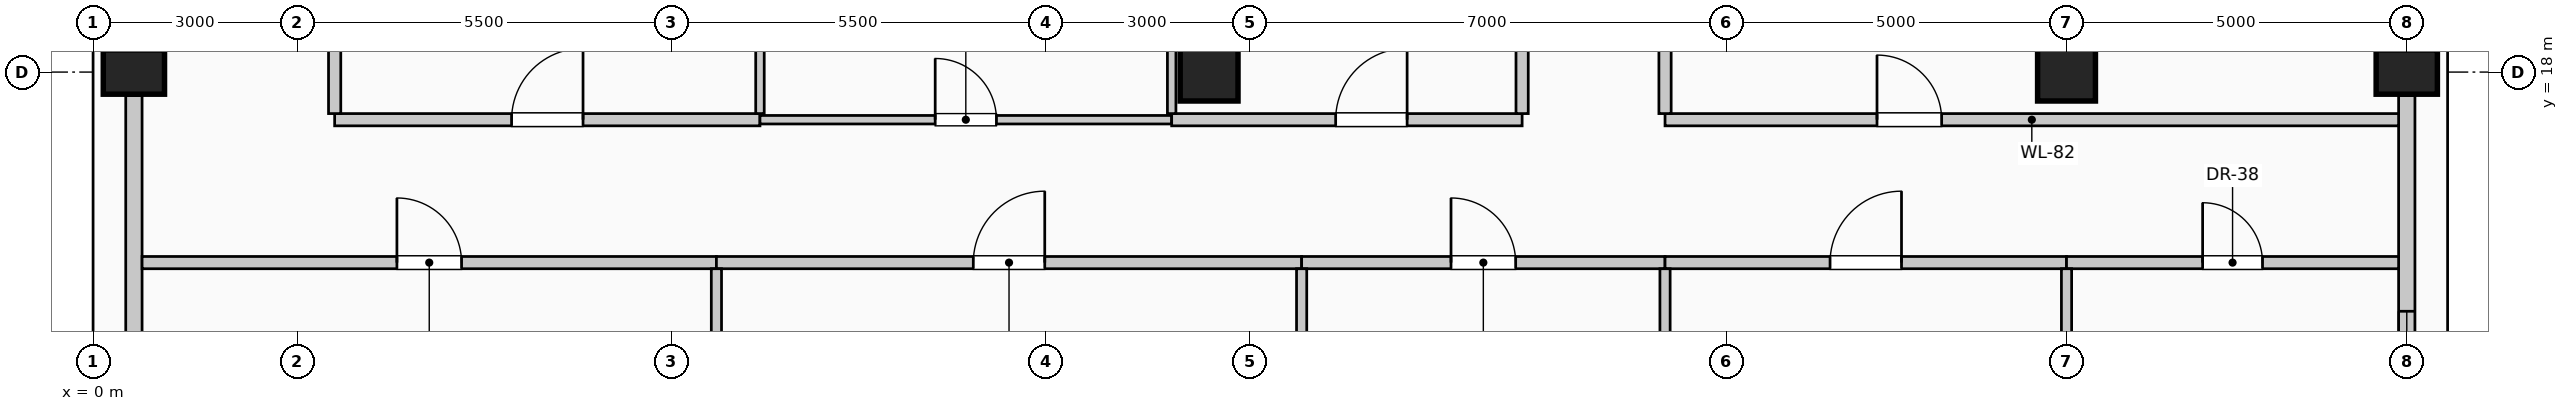
"""IFC4 building model, lengths in metres.
Left out: names, types, materials, properties, quantities, classifications, styles, units other than length and angle.
Written with IfcOpenShell. Run it as: python <this file> out.ifc"""

import sys

from ifc_helpers import new_model, si_unit, direction, frame, frame_2d, origin, origin_2d, place, context, subcontext, project, spatial, rectangle, circle, extrude, element, fill, save


model = new_model("IFC4")
c1 = context("Model", 3, precision=1e-05, world=origin(), true_north=direction((0.0, 1.0)))
c2 = subcontext(c1, "Body", "Model", "MODEL_VIEW")
j1 = project(units=[si_unit("LENGTHUNIT", "METRE"), si_unit("PLANEANGLEUNIT", "RADIAN")], contexts=[c1])
p1 = place(None, origin())
s1 = spatial("IfcSite", under=j1, at=p1, CompositionType="ELEMENT")
p2 = place(p1, origin())
s2 = spatial("IfcBuilding", under=s1, at=p2, CompositionType="ELEMENT")
p3 = place(p2, frame((0.0, 0.0, 309.0)))
s3 = spatial("IfcBuildingStorey", under=s2, at=p3, CompositionType="ELEMENT", Elevation=309.0)
for number, where, z_axis, x_axis in (
    (1, (0.6, 18.0, 0.0), (0.0, 0.0, 1.0), (0.0, 1.0, 0.0)),
    (2, (34.0, 18.0, 0.0), (0.0, 0.0, 1.0), (0.0, 1.0, 0.0)),
):
    element("IfcColumn", number, at=place(p3, frame(where, z_axis=z_axis, x_axis=x_axis)), inside=s3, PredefinedType="COLUMN", context=c2, shape_type="SweptSolid", body=[
        extrude(rectangle(XDim=0.65, YDim=0.9, at=origin_2d()), origin(), (0.0, 0.0, 1.0), 4.0),
    ])
for number, where, z_axis, x_axis in (
    (3, (16.4, 18.0, 0.0), (0.0, 0.0, 1.0), (1.0, 0.0, 0.0)),
    (4, (29.0, 18.0, 0.0), (0.0, 0.0, 1.0), (1.0, 0.0, 0.0)),
):
    element("IfcColumn", number, at=place(p3, frame(where, z_axis=z_axis, x_axis=x_axis)), inside=s3, PredefinedType="COLUMN", context=c2, shape_type="SweptSolid", body=[
        extrude(circle(Radius=0.425, at=origin_2d()), origin(), (0.0, 0.0, 1.0), 4.0),
    ])
p4 = place(p3, frame((0.6, 10.345, 0.0), z_axis=(0.0, 0.0, 1.0), x_axis=(0.0, 1.0, 0.0)))
e5 = element("IfcWall", 5, at=p4, inside=s3, PredefinedType="SOLIDWALL", context=c2, shape_type="SweptSolid", body=[
    extrude(rectangle(XDim=7.31, YDim=0.24, at=frame_2d((3.655, 0.0))), origin(), (0.0, 0.0, 1.0), 3.025),
])
p5 = place(p4, frame((1.037, 0.0, 0.35)))
e6 = element("IfcOpeningElement", 6, at=p5, cuts=e5, PredefinedType="OPENING", context=c2, shape_type="SweptSolid", body=[
    extrude(rectangle(XDim=2.1, YDim=2.2, at=frame_2d((1.05, 1.1))), frame((0.0, 0.13, 0.0), z_axis=(0.0, -1.0, 0.0), x_axis=(1.0, 0.0, 0.0)), (0.0, 0.0, 1.0), 0.26),
])
p6 = place(p3, frame((34.0, 17.655, 0.0), z_axis=(0.0, 0.0, 1.0), x_axis=(0.0, -1.0, 0.0)))
e7 = element("IfcWall", 7, at=p6, inside=s3, PredefinedType="SOLIDWALL", context=c2, shape_type="SweptSolid", body=[
    extrude(rectangle(XDim=13.71, YDim=0.24, at=frame_2d((6.855, 0.0))), origin(), (0.0, 0.0, 1.0), 3.025),
])
p7 = place(p6, frame((3.17, 0.0, 0.35)))
e8 = element("IfcOpeningElement", 8, at=p7, cuts=e7, PredefinedType="OPENING", context=c2, shape_type="SweptSolid", body=[
    extrude(rectangle(XDim=2.1, YDim=2.2, at=frame_2d((1.05, 1.1))), frame((0.0, 0.13, 0.0), z_axis=(0.0, -1.0, 0.0), x_axis=(1.0, 0.0, 0.0)), (0.0, 0.0, 1.0), 0.26),
])
p8 = place(p6, frame((8.44, 0.0, 0.35)))
e9 = element("IfcOpeningElement", 9, at=p8, cuts=e7, PredefinedType="OPENING", context=c2, shape_type="SweptSolid", body=[
    extrude(rectangle(XDim=2.1, YDim=2.2, at=frame_2d((1.05, 1.1))), frame((0.0, 0.13, 0.0), z_axis=(0.0, -1.0, 0.0), x_axis=(1.0, 0.0, 0.0)), (0.0, 0.0, 1.0), 0.26),
])
p9 = place(p3, frame((0.72, 15.2, 0.0), z_axis=(0.0, 0.0, 1.0), x_axis=(1.0, 0.0, 0.0)))
e10 = element("IfcWall", 10, at=p9, inside=s3, PredefinedType="PARTITIONING", context=c2, shape_type="SweptSolid", body=[
    extrude(rectangle(XDim=8.44, YDim=0.18, at=frame_2d((4.22, 0.0))), origin(), (0.0, 0.0, 1.0), 3.775),
])
p10 = place(p9, frame((3.745, 0.0, 0.0)))
e11 = element("IfcOpeningElement", 11, at=p10, cuts=e10, PredefinedType="OPENING", context=c2, shape_type="SweptSolid", body=[
    extrude(rectangle(XDim=0.95, YDim=2.15, at=frame_2d((0.475, 1.075))), frame((0.0, 0.1, 0.0), z_axis=(0.0, -1.0, 0.0), x_axis=(1.0, 0.0, 0.0)), (0.0, 0.0, 1.0), 0.2),
])
p11 = place(p3, frame((9.16, 15.2, 0.0), z_axis=(0.0, 0.0, 1.0), x_axis=(1.0, 0.0, 0.0)))
e12 = element("IfcWall", 12, at=p11, inside=s3, PredefinedType="PARTITIONING", context=c2, shape_type="SweptSolid", body=[
    extrude(rectangle(XDim=8.6, YDim=0.18, at=frame_2d((4.3, 0.0))), origin(), (0.0, 0.0, 1.0), 3.775),
])
p12 = place(p11, frame((3.775, 0.0, 0.0)))
e13 = element("IfcOpeningElement", 13, at=p12, cuts=e12, PredefinedType="OPENING", context=c2, shape_type="SweptSolid", body=[
    extrude(rectangle(XDim=1.05, YDim=2.15, at=frame_2d((0.525, 1.075))), frame((0.0, 0.1, 0.0), z_axis=(0.0, -1.0, 0.0), x_axis=(1.0, 0.0, 0.0)), (0.0, 0.0, 1.0), 0.2),
])
p13 = place(p3, frame((17.76, 15.2, 0.0), z_axis=(0.0, 0.0, 1.0), x_axis=(1.0, 0.0, 0.0)))
e14 = element("IfcWall", 14, at=p13, inside=s3, PredefinedType="PARTITIONING", context=c2, shape_type="SweptSolid", body=[
    extrude(rectangle(XDim=5.34, YDim=0.18, at=frame_2d((2.67, 0.0))), origin(), (0.0, 0.0, 1.0), 3.775),
])
p14 = place(p13, frame((2.195, 0.0, 0.0)))
e15 = element("IfcOpeningElement", 15, at=p14, cuts=e14, PredefinedType="OPENING", context=c2, shape_type="SweptSolid", body=[
    extrude(rectangle(XDim=0.95, YDim=2.15, at=frame_2d((0.475, 1.075))), frame((0.0, 0.1, 0.0), z_axis=(0.0, -1.0, 0.0), x_axis=(1.0, 0.0, 0.0)), (0.0, 0.0, 1.0), 0.2),
])
p15 = place(p3, frame((23.1, 15.2, 0.0), z_axis=(0.0, 0.0, 1.0), x_axis=(1.0, 0.0, 0.0)))
e16 = element("IfcWall", 16, at=p15, inside=s3, PredefinedType="PARTITIONING", context=c2, shape_type="SweptSolid", body=[
    extrude(rectangle(XDim=5.9, YDim=0.18, at=frame_2d((2.95, 0.0))), origin(), (0.0, 0.0, 1.0), 3.775),
])
p16 = place(p15, frame((2.425, 0.0, 0.0)))
e17 = element("IfcOpeningElement", 17, at=p16, cuts=e16, PredefinedType="OPENING", context=c2, shape_type="SweptSolid", body=[
    extrude(rectangle(XDim=1.05, YDim=2.15, at=frame_2d((0.525, 1.075))), frame((0.0, 0.1, 0.0), z_axis=(0.0, -1.0, 0.0), x_axis=(1.0, 0.0, 0.0)), (0.0, 0.0, 1.0), 0.2),
])
p17 = place(p3, frame((29.0, 15.2, 0.0), z_axis=(0.0, 0.0, 1.0), x_axis=(1.0, 0.0, 0.0)))
e18 = element("IfcWall", 18, at=p17, inside=s3, PredefinedType="PARTITIONING", context=c2, shape_type="SweptSolid", body=[
    extrude(rectangle(XDim=4.88, YDim=0.18, at=frame_2d((2.44, 0.0))), origin(), (0.0, 0.0, 1.0), 3.775),
])
p18 = place(p17, frame((2.0, 0.0, 0.0)))
e19 = element("IfcOpeningElement", 19, at=p18, cuts=e18, PredefinedType="OPENING", context=c2, shape_type="SweptSolid", body=[
    extrude(rectangle(XDim=0.88, YDim=2.1, at=frame_2d((0.44, 1.05))), frame((0.0, 0.1, 0.0), z_axis=(0.0, -1.0, 0.0), x_axis=(1.0, 0.0, 0.0)), (0.0, 0.0, 1.0), 0.2),
])
p19 = place(p3, frame((3.55, 17.3, 0.0), z_axis=(0.0, 0.0, 1.0), x_axis=(1.0, 0.0, 0.0)))
e20 = element("IfcWall", 20, at=p19, inside=s3, PredefinedType="PARTITIONING", context=c2, shape_type="SweptSolid", body=[
    extrude(rectangle(XDim=6.25, YDim=0.18, at=frame_2d((3.125, 0.0))), origin(), (0.0, 0.0, 1.0), 3.775),
])
p20 = place(p19, frame((2.6, 0.0, 0.0)))
e21 = element("IfcOpeningElement", 21, at=p20, cuts=e20, PredefinedType="OPENING", context=c2, shape_type="SweptSolid", body=[
    extrude(rectangle(XDim=1.05, YDim=2.15, at=frame_2d((0.525, 1.075))), frame((0.0, 0.1, 0.0), z_axis=(0.0, -1.0, 0.0), x_axis=(1.0, 0.0, 0.0)), (0.0, 0.0, 1.0), 0.2),
])
p21 = place(p3, frame((9.8, 17.3, 0.0), z_axis=(0.0, 0.0, 1.0), x_axis=(1.0, 0.0, 0.0)))
e22 = element("IfcWall", 22, at=p21, inside=s3, PredefinedType="PARTITIONING", context=c2, shape_type="SweptSolid", body=[
    extrude(rectangle(XDim=6.05, YDim=0.125, at=frame_2d((3.025, 0.0))), origin(), (0.0, 0.0, 1.0), 3.775),
])
p22 = place(p21, frame((2.575, 0.0, 0.0)))
e23 = element("IfcOpeningElement", 23, at=p22, cuts=e22, PredefinedType="OPENING", context=c2, shape_type="SweptSolid", body=[
    extrude(rectangle(XDim=0.9, YDim=2.1, at=frame_2d((0.45, 1.05))), frame((0.0, 0.073, 0.0), z_axis=(0.0, -1.0, 0.0), x_axis=(1.0, 0.0, 0.0)), (0.0, 0.0, 1.0), 0.145),
])
p23 = place(p3, frame((15.85, 17.3, 0.0), z_axis=(0.0, 0.0, 1.0), x_axis=(1.0, 0.0, 0.0)))
e24 = element("IfcWall", 24, at=p23, inside=s3, PredefinedType="PARTITIONING", context=c2, shape_type="SweptSolid", body=[
    extrude(rectangle(XDim=5.15, YDim=0.18, at=frame_2d((2.575, 0.0))), origin(), (0.0, 0.0, 1.0), 3.775),
])
p24 = place(p23, frame((2.41, 0.0, 0.0)))
e25 = element("IfcOpeningElement", 25, at=p24, cuts=e24, PredefinedType="OPENING", context=c2, shape_type="SweptSolid", body=[
    extrude(rectangle(XDim=1.05, YDim=2.15, at=frame_2d((0.525, 1.075))), frame((0.0, 0.1, 0.0), z_axis=(0.0, -1.0, 0.0), x_axis=(1.0, 0.0, 0.0)), (0.0, 0.0, 1.0), 0.2),
])
p25 = place(p3, frame((23.1, 17.3, 0.0), z_axis=(0.0, 0.0, 1.0), x_axis=(1.0, 0.0, 0.0)))
e26 = element("IfcWall", 26, at=p25, inside=s3, PredefinedType="PARTITIONING", context=c2, shape_type="SweptSolid", body=[
    extrude(rectangle(XDim=10.78, YDim=0.18, at=frame_2d((5.39, 0.0))), origin(), (0.0, 0.0, 1.0), 3.775),
])
p26 = place(p25, frame((3.115, 0.0, 0.0)))
e27 = element("IfcOpeningElement", 27, at=p26, cuts=e26, PredefinedType="OPENING", context=c2, shape_type="SweptSolid", body=[
    extrude(rectangle(XDim=0.95, YDim=2.15, at=frame_2d((0.475, 1.075))), frame((0.0, 0.1, 0.0), z_axis=(0.0, -1.0, 0.0), x_axis=(1.0, 0.0, 0.0)), (0.0, 0.0, 1.0), 0.2),
])
p27 = place(p3, frame((3.55, 17.39, 0.0), z_axis=(0.0, 0.0, 1.0), x_axis=(0.0, 1.0, 0.0)))
e28 = element("IfcWall", 28, at=p27, inside=s3, PredefinedType="PARTITIONING", context=c2, shape_type="SweptSolid", body=[
    extrude(rectangle(XDim=7.335, YDim=0.18, at=frame_2d((3.667, 0.0))), origin(), (0.0, 0.0, 1.0), 3.775),
])
p28 = place(p3, frame((9.16, 0.72, 0.0), z_axis=(0.0, 0.0, 1.0), x_axis=(0.0, 1.0, 0.0)))
e29 = element("IfcWall", 29, at=p28, inside=s3, PredefinedType="PARTITIONING", context=c2, shape_type="SweptSolid", body=[
    extrude(rectangle(XDim=14.39, YDim=0.15, at=frame_2d((7.195, 0.0))), origin(), (0.0, 0.0, 1.0), 3.775),
])
for number, where, z_axis, x_axis in (
    (30, (9.8, 17.39, 0.0), (0.0, 0.0, 1.0), (0.0, 1.0, 0.0)),
    (31, (15.85, 17.39, 0.0), (0.0, 0.0, 1.0), (0.0, 1.0, 0.0)),
):
    element("IfcWall", number, at=place(p3, frame(where, z_axis=z_axis, x_axis=x_axis)), inside=s3, PredefinedType="PARTITIONING", context=c2, shape_type="SweptSolid", body=[
        extrude(rectangle(XDim=7.335, YDim=0.125, at=frame_2d((3.667, 0.0))), origin(), (0.0, 0.0, 1.0), 3.775),
    ])
p29 = place(p3, frame((17.76, 0.72, 0.0), z_axis=(0.0, 0.0, 1.0), x_axis=(0.0, 1.0, 0.0)))
e32 = element("IfcWall", 32, at=p29, inside=s3, PredefinedType="PARTITIONING", context=c2, shape_type="SweptSolid", body=[
    extrude(rectangle(XDim=14.39, YDim=0.15, at=frame_2d((7.195, 0.0))), origin(), (0.0, 0.0, 1.0), 3.775),
])
p30 = place(p3, frame((21.0, 17.39, 0.0), z_axis=(0.0, 0.0, 1.0), x_axis=(0.0, 1.0, 0.0)))
e33 = element("IfcWall", 33, at=p30, inside=s3, PredefinedType="PARTITIONING", context=c2, shape_type="SweptSolid", body=[
    extrude(rectangle(XDim=7.335, YDim=0.18, at=frame_2d((3.667, 0.0))), origin(), (0.0, 0.0, 1.0), 3.775),
])
p31 = place(p3, frame((23.1, 0.72, 0.0), z_axis=(0.0, 0.0, 1.0), x_axis=(0.0, 1.0, 0.0)))
e34 = element("IfcWall", 34, at=p31, inside=s3, PredefinedType="PARTITIONING", context=c2, shape_type="SweptSolid", body=[
    extrude(rectangle(XDim=14.39, YDim=0.15, at=frame_2d((7.195, 0.0))), origin(), (0.0, 0.0, 1.0), 3.775),
])
p32 = place(p3, frame((23.1, 17.39, 0.0), z_axis=(0.0, 0.0, 1.0), x_axis=(0.0, 1.0, 0.0)))
e35 = element("IfcWall", 35, at=p32, inside=s3, PredefinedType="PARTITIONING", context=c2, shape_type="SweptSolid", body=[
    extrude(rectangle(XDim=8.835, YDim=0.18, at=frame_2d((4.417, 0.0))), origin(), (0.0, 0.0, 1.0), 3.775),
])
p33 = place(p3, frame((29.0, 1.05, 0.0), z_axis=(0.0, 0.0, 1.0), x_axis=(0.0, 1.0, 0.0)))
e36 = element("IfcWall", 36, at=p33, inside=s3, PredefinedType="PARTITIONING", context=c2, shape_type="SweptSolid", body=[
    extrude(rectangle(XDim=14.06, YDim=0.15, at=frame_2d((7.03, 0.0))), origin(), (0.0, 0.0, 1.0), 3.27),
])
p34 = place(p7, origin())
e37 = element("IfcWindow", 37, at=p34, inside=s3, PartitioningType="SINGLE_PANEL", PredefinedType="WINDOW", context=c2, shape_type="SweptSolid", body=[
    extrude(rectangle(XDim=2.1, YDim=2.2, at=frame_2d((1.05, 1.1))), frame((0.0, 0.03, 0.0), z_axis=(0.0, -1.0, 0.0), x_axis=(1.0, 0.0, 0.0)), (0.0, 0.0, 1.0), 0.06),
])
fill(e8, e37)
p35 = place(p10, origin())
e38 = element("IfcDoor", 38, at=p35, inside=s3, OperationType="SINGLE_SWING_LEFT", PredefinedType="DOOR", context=c2, shape_type="SweptSolid", body=[
    extrude(rectangle(XDim=0.95, YDim=2.15, at=frame_2d((0.475, 1.075))), frame((0.0, 0.025, 0.0), z_axis=(0.0, -1.0, 0.0), x_axis=(1.0, 0.0, 0.0)), (0.0, 0.0, 1.0), 0.05),
])
fill(e11, e38)
p36 = place(p12, origin())
e39 = element("IfcDoor", 39, at=p36, inside=s3, OperationType="SINGLE_SWING_RIGHT", PredefinedType="DOOR", context=c2, shape_type="SweptSolid", body=[
    extrude(rectangle(XDim=1.05, YDim=2.15, at=frame_2d((0.525, 1.075))), frame((0.0, 0.025, 0.0), z_axis=(0.0, -1.0, 0.0), x_axis=(1.0, 0.0, 0.0)), (0.0, 0.0, 1.0), 0.05),
])
fill(e13, e39)
p37 = place(p14, origin())
e40 = element("IfcDoor", 40, at=p37, inside=s3, OperationType="SINGLE_SWING_LEFT", PredefinedType="DOOR", context=c2, shape_type="SweptSolid", body=[
    extrude(rectangle(XDim=0.95, YDim=2.15, at=frame_2d((0.475, 1.075))), frame((0.0, 0.025, 0.0), z_axis=(0.0, -1.0, 0.0), x_axis=(1.0, 0.0, 0.0)), (0.0, 0.0, 1.0), 0.05),
])
fill(e15, e40)
p38 = place(p16, origin())
e41 = element("IfcDoor", 41, at=p38, inside=s3, OperationType="SINGLE_SWING_RIGHT", PredefinedType="DOOR", context=c2, shape_type="SweptSolid", body=[
    extrude(rectangle(XDim=1.05, YDim=2.15, at=frame_2d((0.525, 1.075))), frame((0.0, 0.025, 0.0), z_axis=(0.0, -1.0, 0.0), x_axis=(1.0, 0.0, 0.0)), (0.0, 0.0, 1.0), 0.05),
])
fill(e17, e41)
p39 = place(p18, origin())
e42 = element("IfcDoor", 42, at=p39, inside=s3, OperationType="SINGLE_SWING_LEFT", PredefinedType="DOOR", context=c2, shape_type="SweptSolid", body=[
    extrude(rectangle(XDim=0.88, YDim=2.1, at=frame_2d((0.44, 1.05))), frame((0.0, 0.025, 0.0), z_axis=(0.0, -1.0, 0.0), x_axis=(1.0, 0.0, 0.0)), (0.0, 0.0, 1.0), 0.05),
])
fill(e19, e42)
p40 = place(p20, origin())
e43 = element("IfcDoor", 43, at=p40, inside=s3, OperationType="SINGLE_SWING_RIGHT", PredefinedType="DOOR", context=c2, shape_type="SweptSolid", body=[
    extrude(rectangle(XDim=1.05, YDim=2.15, at=frame_2d((0.525, 1.075))), frame((0.0, 0.025, 0.0), z_axis=(0.0, -1.0, 0.0), x_axis=(1.0, 0.0, 0.0)), (0.0, 0.0, 1.0), 0.05),
])
fill(e21, e43)
p41 = place(p22, origin())
e44 = element("IfcDoor", 44, at=p41, inside=s3, OperationType="SINGLE_SWING_LEFT", PredefinedType="DOOR", context=c2, shape_type="SweptSolid", body=[
    extrude(rectangle(XDim=0.9, YDim=2.1, at=frame_2d((0.45, 1.05))), frame((0.0, 0.025, 0.0), z_axis=(0.0, -1.0, 0.0), x_axis=(1.0, 0.0, 0.0)), (0.0, 0.0, 1.0), 0.05),
])
fill(e23, e44)
p42 = place(p24, origin())
e45 = element("IfcDoor", 45, at=p42, inside=s3, OperationType="SINGLE_SWING_RIGHT", PredefinedType="DOOR", context=c2, shape_type="SweptSolid", body=[
    extrude(rectangle(XDim=1.05, YDim=2.15, at=frame_2d((0.525, 1.075))), frame((0.0, 0.025, 0.0), z_axis=(0.0, -1.0, 0.0), x_axis=(1.0, 0.0, 0.0)), (0.0, 0.0, 1.0), 0.05),
])
fill(e25, e45)
p43 = place(p26, origin())
e46 = element("IfcDoor", 46, at=p43, inside=s3, OperationType="SINGLE_SWING_LEFT", PredefinedType="DOOR", context=c2, shape_type="SweptSolid", body=[
    extrude(rectangle(XDim=0.95, YDim=2.15, at=frame_2d((0.475, 1.075))), frame((0.0, 0.025, 0.0), z_axis=(0.0, -1.0, 0.0), x_axis=(1.0, 0.0, 0.0)), (0.0, 0.0, 1.0), 0.05),
])
fill(e27, e46)
save(model, sys.argv[1])
